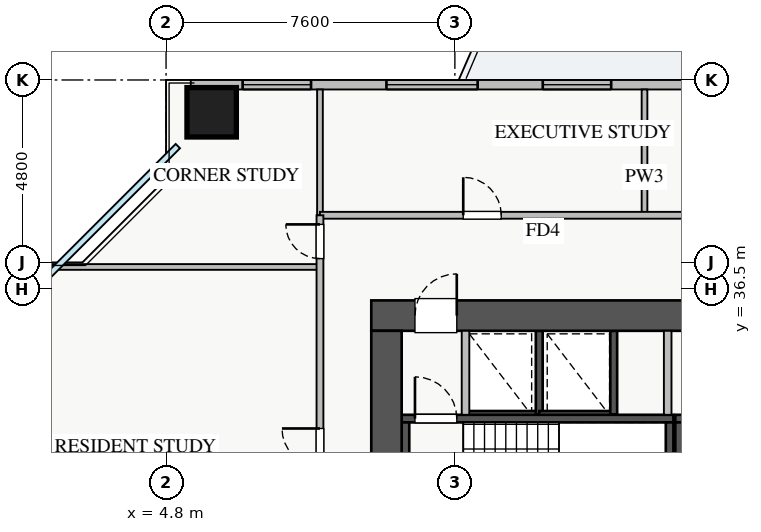
"""IFC4 building model, lengths in metres.
Left out: names, types, materials, properties, quantities, classifications, styles, units other than length and angle.
Written with IfcOpenShell. Run it as: python <this file> out.ifc"""

import sys

from ifc_helpers import new_model, si_unit, direction, frame, frame_2d, origin, origin_2d, place, context, subcontext, project, spatial, rectangle, extrude, source, transform, mapped, element, fill, save


model = new_model("IFC4")
c1 = context("Model", 3, precision=1e-05, world=origin(), true_north=direction((0.0, 1.0)))
c2 = subcontext(c1, "Body", "Model", "MODEL_VIEW")
j1 = project(units=[si_unit("LENGTHUNIT", "METRE"), si_unit("PLANEANGLEUNIT", "RADIAN")], contexts=[c1])
p1 = place(None, origin())
s1 = spatial("IfcSite", under=j1, at=p1, CompositionType="ELEMENT")
p2 = place(p1, origin())
s2 = spatial("IfcBuilding", under=s1, at=p2, CompositionType="ELEMENT")
p3 = place(p2, frame((0.0, 0.0, 36.0)))
s3 = spatial("IfcBuildingStorey", under=s2, at=p3, CompositionType="ELEMENT", Elevation=36.0)
p4 = place(p3, frame((12.68, 33.2, 0.0), z_axis=(0.0, 0.0, 1.0), x_axis=(1.0, 0.0, 0.0)))
e1 = element("IfcWall", 1, at=p4, inside=s3, PredefinedType="SHEAR", context=c2, shape_type="SweptSolid", body=[
    extrude(rectangle(XDim=1.94, YDim=0.18, at=frame_2d((0.97, 0.0))), origin(), (0.0, 0.0, 1.0), 3.07),
])
p5 = place(p3, frame((14.62, 33.2, 0.0), z_axis=(0.0, 0.0, 1.0), x_axis=(0.0, 1.0, 0.0)))
e2 = element("IfcWall", 2, at=p5, inside=s3, PredefinedType="SHEAR", context=c2, shape_type="SweptSolid", body=[
    extrude(rectangle(XDim=2.2, YDim=0.18, at=frame_2d((1.1, 0.0))), origin(), (0.0, 0.0, 1.0), 3.07),
])
p6 = place(p3, frame((14.62, 33.2, 0.0), z_axis=(0.0, 0.0, 1.0), x_axis=(1.0, 0.0, 0.0)))
e3 = element("IfcWall", 3, at=p6, inside=s3, PredefinedType="SHEAR", context=c2, shape_type="SweptSolid", body=[
    extrude(rectangle(XDim=1.96, YDim=0.18, at=frame_2d((0.98, 0.0))), origin(), (0.0, 0.0, 1.0), 3.07),
])
p7 = place(p3, frame((16.58, 33.2, 0.0), z_axis=(0.0, 0.0, 1.0), x_axis=(0.0, 1.0, 0.0)))
e4 = element("IfcWall", 4, at=p7, inside=s3, PredefinedType="SHEAR", context=c2, shape_type="SweptSolid", body=[
    extrude(rectangle(XDim=2.2, YDim=0.18, at=frame_2d((1.1, 0.0))), origin(), (0.0, 0.0, 1.0), 3.07),
])
p8 = place(p3, frame((11.0, 33.09, 0.0), z_axis=(0.0, 0.0, 1.0), x_axis=(1.0, 0.0, 0.0)))
e5 = element("IfcWall", 5, at=p8, inside=s3, PredefinedType="SHEAR", context=c2, shape_type="SweptSolid", body=[
    extrude(rectangle(XDim=7.15, YDim=0.2, at=frame_2d((3.575, 0.0))), origin(), (0.0, 0.0, 1.0), 3.25),
])
p9 = place(p8, frame((0.35, 0.0, 0.0)))
e6 = element("IfcOpeningElement", 6, at=p9, cuts=e5, PredefinedType="OPENING", context=c2, shape_type="SweptSolid", body=[
    extrude(rectangle(XDim=1.1, YDim=2.05, at=frame_2d((0.55, 1.025))), frame((0.0, 0.11, 0.0), z_axis=(0.0, -1.0, 0.0), x_axis=(1.0, 0.0, 0.0)), (0.0, 0.0, 1.0), 0.22),
])
for number, where, z_axis, x_axis in (
    (7, (11.1, 30.05, 0.0), (0.0, 0.0, 1.0), (0.0, 1.0, 0.0)),
    (8, (18.05, 30.05, 0.0), (0.0, 0.0, 1.0), (0.0, 1.0, 0.0)),
):
    element("IfcWall", number, at=place(p3, frame(where, z_axis=z_axis, x_axis=x_axis)), inside=s3, PredefinedType="SHEAR", context=c2, shape_type="SweptSolid", body=[
        extrude(rectangle(XDim=2.94, YDim=0.2, at=frame_2d((1.47, 0.0))), origin(), (0.0, 0.0, 1.0), 3.25),
    ])
p10 = place(p3, frame((18.2, 33.09, 0.0), z_axis=(0.0, 0.0, 1.0), x_axis=(1.0, 0.0, 0.0)))
e9 = element("IfcWall", 9, at=p10, inside=s3, PredefinedType="SHEAR", context=c2, shape_type="SweptSolid", body=[
    extrude(rectangle(XDim=7.15, YDim=0.2, at=frame_2d((3.575, 0.0))), origin(), (0.0, 0.0, 1.0), 3.25),
])
p11 = place(p10, frame((0.35, 0.0, 0.0)))
e10 = element("IfcOpeningElement", 10, at=p11, cuts=e9, PredefinedType="OPENING", context=c2, shape_type="SweptSolid", body=[
    extrude(rectangle(XDim=1.1, YDim=2.05, at=frame_2d((0.55, 1.025))), frame((0.0, 0.11, 0.0), z_axis=(0.0, -1.0, 0.0), x_axis=(1.0, 0.0, 0.0)), (0.0, 0.0, 1.0), 0.22),
])
p12 = place(p3, frame((18.3, 30.05, 0.0), z_axis=(0.0, 0.0, 1.0), x_axis=(0.0, 1.0, 0.0)))
e11 = element("IfcWall", 11, at=p12, inside=s3, PredefinedType="SHEAR", context=c2, shape_type="SweptSolid", body=[
    extrude(rectangle(XDim=2.94, YDim=0.2, at=frame_2d((1.47, 0.0))), origin(), (0.0, 0.0, 1.0), 3.25),
])
p13 = place(p3, frame((10.2, 35.8, 0.0), z_axis=(0.0, 0.0, 1.0), x_axis=(1.0, 0.0, 0.0)))
e12 = element("IfcWall", 12, at=p13, inside=s3, PredefinedType="SHEAR", context=c2, shape_type="SweptSolid", body=[
    extrude(rectangle(XDim=17.6, YDim=0.8, at=frame_2d((8.8, 0.0))), origin(), (0.0, 0.0, 1.0), 3.25),
])
p14 = place(p13, frame((1.15, 0.0, 0.0)))
e13 = element("IfcOpeningElement", 13, at=p14, cuts=e12, PredefinedType="OPENING", context=c2, shape_type="SweptSolid", body=[
    extrude(rectangle(XDim=1.1, YDim=2.05, at=frame_2d((0.55, 1.025))), frame((0.0, 0.41, 0.0), z_axis=(0.0, -1.0, 0.0), x_axis=(1.0, 0.0, 0.0)), (0.0, 0.0, 1.0), 0.82),
])
p15 = place(p13, frame((8.3, 0.0, 0.0)))
e14 = element("IfcOpeningElement", 14, at=p15, cuts=e12, PredefinedType="OPENING", context=c2, shape_type="SweptSolid", body=[
    extrude(rectangle(XDim=1.1, YDim=2.05, at=frame_2d((0.55, 1.025))), frame((0.0, 0.41, 0.0), z_axis=(0.0, -1.0, 0.0), x_axis=(1.0, 0.0, 0.0)), (0.0, 0.0, 1.0), 0.82),
])
p16 = place(p13, frame((10.05, 0.0, 0.0)))
e15 = element("IfcOpeningElement", 15, at=p16, cuts=e12, PredefinedType="OPENING", context=c2, shape_type="SweptSolid", body=[
    extrude(rectangle(XDim=1.1, YDim=2.05, at=frame_2d((0.55, 1.025))), frame((0.0, 0.41, 0.0), z_axis=(0.0, -1.0, 0.0), x_axis=(1.0, 0.0, 0.0)), (0.0, 0.0, 1.0), 0.82),
])
p17 = place(p13, frame((14.74, 0.0, 0.0)))
e16 = element("IfcOpeningElement", 16, at=p17, cuts=e12, PredefinedType="OPENING", context=c2, shape_type="SweptSolid", body=[
    extrude(rectangle(XDim=1.0, YDim=2.05, at=frame_2d((0.5, 1.025))), frame((0.0, 0.41, 0.0), z_axis=(0.0, -1.0, 0.0), x_axis=(1.0, 0.0, 0.0)), (0.0, 0.0, 1.0), 0.82),
])
p18 = place(p13, frame((12.585, 0.0, 0.0)))
e17 = element("IfcOpeningElement", 17, at=p18, cuts=e12, PredefinedType="OPENING", context=c2, shape_type="SweptSolid", body=[
    extrude(rectangle(XDim=1.0, YDim=2.05, at=frame_2d((0.5, 1.025))), frame((0.0, 0.41, 0.0), z_axis=(0.0, -1.0, 0.0), x_axis=(1.0, 0.0, 0.0)), (0.0, 0.0, 1.0), 0.82),
])
p19 = place(p3, frame((10.6, 29.8, 0.0), z_axis=(0.0, 0.0, 1.0), x_axis=(0.0, 1.0, 0.0)))
e18 = element("IfcWall", 18, at=p19, inside=s3, PredefinedType="SHEAR", context=c2, shape_type="SweptSolid", body=[
    extrude(rectangle(XDim=5.6, YDim=0.8, at=frame_2d((2.8, 0.0))), origin(), (0.0, 0.0, 1.0), 3.25),
])
m1 = source(origin(), c2, "Body", "SweptSolid", [
    extrude(rectangle(XDim=1.3, YDim=1.3, at=origin_2d()), origin(), (0.0, 0.0, 1.0), 3.25),
])
p20 = place(p3, frame((6.0, 41.15, 0.0), z_axis=(0.0, 0.0, 1.0), x_axis=(1.0, 0.0, 0.0)))
e19 = element("IfcColumn", 19, at=p20, inside=s3, PredefinedType="COLUMN", context=c2, shape_type="MappedRepresentation", body=[
    mapped(m1, transform((0.0, 0.0, 0.0), x_axis=(1.0, 0.0, 0.0), y_axis=(0.0, 1.0, 0.0), z_axis=(0.0, 0.0, 1.0), scale=1.0)),
])
p21 = place(p3, frame((5.45, 41.875, 0.0), z_axis=(0.0, 0.0, 1.0), x_axis=(1.0, 0.0, 0.0)))
e20 = element("IfcWall", 20, at=p21, inside=s3, PredefinedType="STANDARD", context=c2, shape_type="SweptSolid", body=[
    extrude(rectangle(XDim=27.1, YDim=0.25, at=frame_2d((13.55, 0.0))), origin(), (0.0, 0.0, 1.0), 2.61),
])
p22 = place(p21, frame((14.4, 0.0, 0.0)))
e21 = element("IfcOpeningElement", 21, at=p22, cuts=e20, PredefinedType="OPENING", context=c2, shape_type="SweptSolid", body=[
    extrude(rectangle(XDim=1.2, YDim=2.1, at=frame_2d((0.6, 1.05))), frame((0.0, 0.135, 0.0), z_axis=(0.0, -1.0, 0.0), x_axis=(1.0, 0.0, 0.0)), (0.0, 0.0, 1.0), 0.27),
])
p23 = place(p21, frame((1.365, 0.0, 0.9)))
e22 = element("IfcOpeningElement", 22, at=p23, cuts=e20, PredefinedType="OPENING", context=c2, shape_type="SweptSolid", body=[
    extrude(rectangle(XDim=1.8, YDim=1.5, at=frame_2d((0.9, 0.75))), frame((0.0, 0.135, 0.0), z_axis=(0.0, -1.0, 0.0), x_axis=(1.0, 0.0, 0.0)), (0.0, 0.0, 1.0), 0.27),
])
p24 = place(p21, frame((9.263, 0.0, 0.9)))
e23 = element("IfcOpeningElement", 23, at=p24, cuts=e20, PredefinedType="OPENING", context=c2, shape_type="SweptSolid", body=[
    extrude(rectangle(XDim=1.8, YDim=1.45, at=frame_2d((0.9, 0.725))), frame((0.0, 0.135, 0.0), z_axis=(0.0, -1.0, 0.0), x_axis=(1.0, 0.0, 0.0)), (0.0, 0.0, 1.0), 0.27),
])
p25 = place(p21, frame((16.188, 0.0, 0.9)))
e24 = element("IfcOpeningElement", 24, at=p25, cuts=e20, PredefinedType="OPENING", context=c2, shape_type="SweptSolid", body=[
    extrude(rectangle(XDim=1.5, YDim=1.45, at=frame_2d((0.75, 0.725))), frame((0.0, 0.135, 0.0), z_axis=(0.0, -1.0, 0.0), x_axis=(1.0, 0.0, 0.0)), (0.0, 0.0, 1.0), 0.27),
])
p26 = place(p21, frame((22.663, 0.0, 0.9)))
e25 = element("IfcOpeningElement", 25, at=p26, cuts=e20, PredefinedType="OPENING", context=c2, shape_type="SweptSolid", body=[
    extrude(rectangle(XDim=2.1, YDim=1.48, at=frame_2d((1.05, 0.74))), frame((0.0, 0.135, 0.0), z_axis=(0.0, -1.0, 0.0), x_axis=(1.0, 0.0, 0.0)), (0.0, 0.0, 1.0), 0.27),
])
p27 = place(p21, frame((5.149, 0.0, 0.9)))
e26 = element("IfcOpeningElement", 26, at=p27, cuts=e20, PredefinedType="OPENING", context=c2, shape_type="SweptSolid", body=[
    extrude(rectangle(XDim=2.4, YDim=1.5, at=frame_2d((1.2, 0.75))), frame((0.0, 0.135, 0.0), z_axis=(0.0, -1.0, 0.0), x_axis=(1.0, 0.0, 0.0)), (0.0, 0.0, 1.0), 0.27),
])
for number, where, z_axis, x_axis in (
    (27, (12.68, 33.19, 0.0), (0.0, 0.0, 1.0), (0.0, 1.0, 0.0)),
    (28, (18.0, 33.19, 0.0), (0.0, 0.0, 1.0), (0.0, 1.0, 0.0)),
):
    element("IfcWall", number, at=place(p3, frame(where, z_axis=z_axis, x_axis=x_axis)), inside=s3, PredefinedType="PARTITIONING", context=c2, shape_type="SweptSolid", body=[
        extrude(rectangle(XDim=2.21, YDim=0.2, at=frame_2d((1.105, 0.0))), origin(), (0.0, 0.0, 1.0), 3.07),
    ])
for number, where, z_axis, x_axis in (
    (29, (17.39, 38.44, 0.0), (0.0, 0.0, 1.0), (0.0, 1.0, 0.0)),
    (30, (8.85, 38.44, 0.0), (0.0, 0.0, 1.0), (0.0, 1.0, 0.0)),
):
    element("IfcWall", number, at=place(p3, frame(where, z_axis=z_axis, x_axis=x_axis)), inside=s3, PredefinedType="PARTITIONING", context=c2, shape_type="SweptSolid", body=[
        extrude(rectangle(XDim=3.31, YDim=0.15, at=frame_2d((1.655, 0.0))), origin(), (0.0, 0.0, 1.0), 3.07),
    ])
p28 = place(p3, frame((8.85, 38.44, 0.0), z_axis=(0.0, 0.0, 1.0), x_axis=(1.0, 0.0, 0.0)))
e31 = element("IfcWall", 31, at=p28, inside=s3, PredefinedType="PARTITIONING", context=c2, shape_type="SweptSolid", body=[
    extrude(rectangle(XDim=23.57, YDim=0.18, at=frame_2d((11.785, 0.0))), origin(), (0.0, 0.0, 1.0), 3.07),
])
p29 = place(p28, frame((3.77, 0.0, 0.0)))
e32 = element("IfcOpeningElement", 32, at=p29, cuts=e31, PredefinedType="OPENING", context=c2, shape_type="SweptSolid", body=[
    extrude(rectangle(XDim=1.0, YDim=2.05, at=frame_2d((0.5, 1.025))), frame((0.0, 0.1, 0.0), z_axis=(0.0, -1.0, 0.0), x_axis=(1.0, 0.0, 0.0)), (0.0, 0.0, 1.0), 0.2),
])
p30 = place(p28, frame((11.625, 0.0, 0.0)))
e33 = element("IfcOpeningElement", 33, at=p30, cuts=e31, PredefinedType="OPENING", context=c2, shape_type="SweptSolid", body=[
    extrude(rectangle(XDim=1.0, YDim=2.05, at=frame_2d((0.5, 1.025))), frame((0.0, 0.1, 0.0), z_axis=(0.0, -1.0, 0.0), x_axis=(1.0, 0.0, 0.0)), (0.0, 0.0, 1.0), 0.2),
])
p31 = place(p28, frame((19.14, 0.0, 0.0)))
e34 = element("IfcOpeningElement", 34, at=p31, cuts=e31, PredefinedType="OPENING", context=c2, shape_type="SweptSolid", body=[
    extrude(rectangle(XDim=1.0, YDim=2.05, at=frame_2d((0.5, 1.025))), frame((0.0, 0.1, 0.0), z_axis=(0.0, -1.0, 0.0), x_axis=(1.0, 0.0, 0.0)), (0.0, 0.0, 1.0), 0.2),
])
p32 = place(p3, frame((0.25, 37.08, 0.0), z_axis=(0.0, 0.0, 1.0), x_axis=(1.0, 0.0, 0.0)))
e35 = element("IfcWall", 35, at=p32, inside=s3, PredefinedType="PARTITIONING", context=c2, shape_type="SweptSolid", body=[
    extrude(rectangle(XDim=8.6, YDim=0.15, at=frame_2d((4.3, 0.0))), origin(), (0.0, 0.0, 1.0), 3.07),
])
p33 = place(p3, frame((8.85, 7.21, 0.0), z_axis=(0.0, 0.0, 1.0), x_axis=(0.0, 1.0, 0.0)))
e36 = element("IfcWall", 36, at=p33, inside=s3, PredefinedType="PARTITIONING", context=c2, shape_type="SweptSolid", body=[
    extrude(rectangle(XDim=31.23, YDim=0.18, at=frame_2d((15.615, 0.0))), origin(), (0.0, 0.0, 1.0), 3.07),
])
p34 = place(p33, frame((30.09, 0.0, 0.0)))
e37 = element("IfcOpeningElement", 37, at=p34, cuts=e36, PredefinedType="OPENING", context=c2, shape_type="SweptSolid", body=[
    extrude(rectangle(XDim=0.9, YDim=2.05, at=frame_2d((0.45, 1.025))), frame((0.0, 0.1, 0.0), z_axis=(0.0, -1.0, 0.0), x_axis=(1.0, 0.0, 0.0)), (0.0, 0.0, 1.0), 0.2),
])
p35 = place(p33, frame((0.24, 0.0, 0.0)))
e38 = element("IfcOpeningElement", 38, at=p35, cuts=e36, PredefinedType="OPENING", context=c2, shape_type="SweptSolid", body=[
    extrude(rectangle(XDim=0.9, YDim=2.05, at=frame_2d((0.45, 1.025))), frame((0.0, 0.1, 0.0), z_axis=(0.0, -1.0, 0.0), x_axis=(1.0, 0.0, 0.0)), (0.0, 0.0, 1.0), 0.2),
])
p36 = place(p33, frame((3.06, 0.0, 0.0)))
e39 = element("IfcOpeningElement", 39, at=p36, cuts=e36, PredefinedType="OPENING", context=c2, shape_type="SweptSolid", body=[
    extrude(rectangle(XDim=1.0, YDim=2.05, at=frame_2d((0.5, 1.025))), frame((0.0, 0.1, 0.0), z_axis=(0.0, -1.0, 0.0), x_axis=(1.0, 0.0, 0.0)), (0.0, 0.0, 1.0), 0.2),
])
p37 = place(p33, frame((12.795, 0.0, 0.0)))
e40 = element("IfcOpeningElement", 40, at=p37, cuts=e36, PredefinedType="OPENING", context=c2, shape_type="SweptSolid", body=[
    extrude(rectangle(XDim=1.0, YDim=2.05, at=frame_2d((0.5, 1.025))), frame((0.0, 0.1, 0.0), z_axis=(0.0, -1.0, 0.0), x_axis=(1.0, 0.0, 0.0)), (0.0, 0.0, 1.0), 0.2),
])
p38 = place(p33, frame((24.62, 0.0, 0.0)))
e41 = element("IfcOpeningElement", 41, at=p38, cuts=e36, PredefinedType="OPENING", context=c2, shape_type="SweptSolid", body=[
    extrude(rectangle(XDim=1.0, YDim=2.05, at=frame_2d((0.5, 1.025))), frame((0.0, 0.1, 0.0), z_axis=(0.0, -1.0, 0.0), x_axis=(1.0, 0.0, 0.0)), (0.0, 0.0, 1.0), 0.2),
])
m2 = source(origin(), c2, "Body", "SweptSolid", [
    extrude(rectangle(XDim=1.8, YDim=1.5, at=frame_2d((0.9, 0.75))), frame((0.0, 0.03, 0.0), z_axis=(0.0, -1.0, 0.0), x_axis=(1.0, 0.0, 0.0)), (0.0, 0.0, 1.0), 0.06),
])
p39 = place(p23, origin())
e42 = element("IfcWindow", 42, at=p39, inside=s3, PartitioningType="TRIPLE_PANEL_VERTICAL", PredefinedType="WINDOW", context=c2, shape_type="MappedRepresentation", body=[
    mapped(m2, transform((0.0, 0.0, 0.0), x_axis=(1.0, 0.0, 0.0), y_axis=(0.0, 1.0, 0.0), z_axis=(0.0, 0.0, 1.0), scale=1.0)),
])
fill(e22, e42)
m3 = source(origin(), c2, "Body", "SweptSolid", [
    extrude(rectangle(XDim=1.8, YDim=1.45, at=frame_2d((0.9, 0.725))), frame((0.0, 0.03, 0.0), z_axis=(0.0, -1.0, 0.0), x_axis=(1.0, 0.0, 0.0)), (0.0, 0.0, 1.0), 0.06),
])
p40 = place(p24, origin())
e43 = element("IfcWindow", 43, at=p40, inside=s3, PartitioningType="DOUBLE_PANEL_VERTICAL", PredefinedType="WINDOW", context=c2, shape_type="MappedRepresentation", body=[
    mapped(m3, transform((0.0, 0.0, 0.0), x_axis=(1.0, 0.0, 0.0), y_axis=(0.0, 1.0, 0.0), z_axis=(0.0, 0.0, 1.0), scale=1.0)),
])
fill(e23, e43)
m4 = source(origin(), c2, "Body", "SweptSolid", [
    extrude(rectangle(XDim=1.1, YDim=2.05, at=frame_2d((0.55, 1.025))), frame((0.0, 0.025, 0.0), z_axis=(0.0, -1.0, 0.0), x_axis=(1.0, 0.0, 0.0)), (0.0, 0.0, 1.0), 0.05),
])
p41 = place(p14, origin())
e44 = element("IfcDoor", 44, at=p41, inside=s3, OperationType="SINGLE_SWING_RIGHT", PredefinedType="DOOR", context=c2, shape_type="MappedRepresentation", body=[
    mapped(m4, transform((0.0, 0.0, 0.0), x_axis=(1.0, 0.0, 0.0), y_axis=(0.0, 1.0, 0.0), z_axis=(0.0, 0.0, 1.0), scale=1.0)),
])
fill(e13, e44)
p42 = place(p9, origin())
e45 = element("IfcDoor", 45, at=p42, inside=s3, OperationType="SINGLE_SWING_LEFT", PredefinedType="DOOR", context=c2, shape_type="MappedRepresentation", body=[
    mapped(m4, transform((0.0, 0.0, 0.0), x_axis=(1.0, 0.0, 0.0), y_axis=(0.0, 1.0, 0.0), z_axis=(0.0, 0.0, 1.0), scale=1.0)),
])
fill(e6, e45)
m5 = source(origin(), c2, "Body", "SweptSolid", [
    extrude(rectangle(XDim=1.0, YDim=2.05, at=frame_2d((0.5, 1.025))), frame((0.0, 0.025, 0.0), z_axis=(0.0, -1.0, 0.0), x_axis=(1.0, 0.0, 0.0)), (0.0, 0.0, 1.0), 0.05),
])
p43 = place(p29, origin())
e46 = element("IfcDoor", 46, at=p43, inside=s3, OperationType="SINGLE_SWING_LEFT", PredefinedType="DOOR", context=c2, shape_type="MappedRepresentation", body=[
    mapped(m5, transform((0.0, 0.0, 0.0), x_axis=(1.0, 0.0, 0.0), y_axis=(0.0, 1.0, 0.0), z_axis=(0.0, 0.0, 1.0), scale=1.0)),
])
fill(e32, e46)
m6 = source(origin(), c2, "Body", "SweptSolid", [
    extrude(rectangle(XDim=0.9, YDim=2.05, at=frame_2d((0.45, 1.025))), frame((0.0, 0.025, 0.0), z_axis=(0.0, -1.0, 0.0), x_axis=(1.0, 0.0, 0.0)), (0.0, 0.0, 1.0), 0.05),
])
p44 = place(p34, origin())
e47 = element("IfcDoor", 47, at=p44, inside=s3, OperationType="SINGLE_SWING_RIGHT", PredefinedType="DOOR", context=c2, shape_type="MappedRepresentation", body=[
    mapped(m6, transform((0.0, 0.0, 0.0), x_axis=(1.0, 0.0, 0.0), y_axis=(0.0, 1.0, 0.0), z_axis=(0.0, 0.0, 1.0), scale=1.0)),
])
fill(e37, e47)
p45 = place(p38, origin())
e48 = element("IfcDoor", 48, at=p45, inside=s3, OperationType="SINGLE_SWING_RIGHT", PredefinedType="DOOR", context=c2, shape_type="MappedRepresentation", body=[
    mapped(m5, transform((0.0, 0.0, 0.0), x_axis=(1.0, 0.0, 0.0), y_axis=(0.0, 1.0, 0.0), z_axis=(0.0, 0.0, 1.0), scale=1.0)),
])
fill(e41, e48)
m7 = source(origin(), c2, "Body", "SweptSolid", [
    extrude(rectangle(XDim=2.4, YDim=1.5, at=frame_2d((1.2, 0.75))), frame((0.0, 0.03, 0.0), z_axis=(0.0, -1.0, 0.0), x_axis=(1.0, 0.0, 0.0)), (0.0, 0.0, 1.0), 0.06),
])
p46 = place(p27, origin())
e49 = element("IfcWindow", 49, at=p46, inside=s3, PartitioningType="TRIPLE_PANEL_VERTICAL", PredefinedType="WINDOW", context=c2, shape_type="MappedRepresentation", body=[
    mapped(m7, transform((0.0, 0.0, 0.0), x_axis=(1.0, 0.0, 0.0), y_axis=(0.0, 1.0, 0.0), z_axis=(0.0, 0.0, 1.0), scale=1.0)),
])
fill(e26, e49)
save(model, sys.argv[1])
